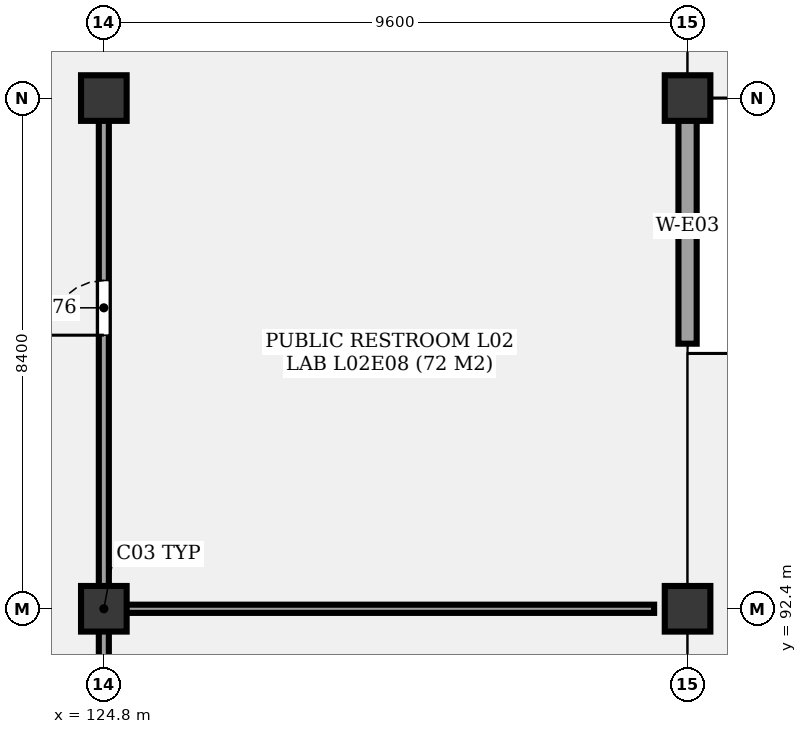
"""IFC4 building model, lengths in metres.
Left out: names, types, materials, properties, quantities, classifications, styles, units other than length and angle.
Written with IfcOpenShell. Run it as: python <this file> out.ifc"""

import sys

from ifc_helpers import new_model, si_unit, direction, frame, frame_2d, origin, origin_2d, place, context, subcontext, project, spatial, rectangle, extrude, element, fill, save


model = new_model("IFC4")
c1 = context("Model", 3, precision=1e-05, world=origin(), true_north=direction((0.0, 1.0)))
c2 = subcontext(c1, "Body", "Model", "MODEL_VIEW")
j1 = project(units=[si_unit("LENGTHUNIT", "METRE"), si_unit("PLANEANGLEUNIT", "RADIAN")], contexts=[c1])
p1 = place(None, origin())
s1 = spatial("IfcSite", under=j1, at=p1, CompositionType="ELEMENT")
p2 = place(p1, origin())
s2 = spatial("IfcBuilding", under=s1, at=p2, CompositionType="ELEMENT")
p3 = place(p2, frame((0.0, 0.0, 9.9)))
s3 = spatial("IfcBuildingStorey", under=s2, at=p3, CompositionType="ELEMENT", Elevation=9.9)
for number, where, z_axis, x_axis in (
    (1, (124.8, 92.4, 0.0), (0.0, 0.0, 1.0), (1.0, 0.0, 0.0)),
    (2, (124.8, 100.8, 0.0), (0.0, 0.0, 1.0), (1.0, 0.0, 0.0)),
    (3, (134.4, 92.4, 0.0), (0.0, 0.0, 1.0), (1.0, 0.0, 0.0)),
    (4, (134.4, 100.8, 0.0), (0.0, 0.0, 1.0), (1.0, 0.0, 0.0)),
):
    element("IfcColumn", number, at=place(p3, frame(where, z_axis=z_axis, x_axis=x_axis)), inside=s3, PredefinedType="COLUMN", context=c2, shape_type="SweptSolid", body=[
        extrude(rectangle(XDim=0.75, YDim=0.75, at=origin_2d()), origin(), (0.0, 0.0, 1.0), 3.6),
    ])
p4 = place(p3, frame((134.4, 100.64, 0.0), z_axis=(0.0, 0.0, 1.0), x_axis=(0.0, -1.0, 0.0)))
e5 = element("IfcWall", 5, at=p4, inside=s3, PredefinedType="SOLIDWALL", context=c2, shape_type="SweptSolid", body=[
    extrude(rectangle(XDim=3.88, YDim=0.3, at=frame_2d((1.94, 0.0))), origin(), (0.0, 0.0, 1.0), 2.57),
])
p5 = place(p3, frame((124.8, 84.25, 0.0), z_axis=(0.0, 0.0, 1.0), x_axis=(0.0, 1.0, 0.0)))
e6 = element("IfcWall", 6, at=p5, inside=s3, PredefinedType="PARTITIONING", context=c2, shape_type="SweptSolid", body=[
    extrude(rectangle(XDim=7.9, YDim=0.165, at=frame_2d((3.95, 0.0))), origin(), (0.0, 0.0, 1.0), 2.48),
])
p6 = place(p5, frame((4.25, 0.0, 0.0)))
e7 = element("IfcOpeningElement", 7, at=p6, cuts=e6, PredefinedType="OPENING", context=c2, shape_type="SweptSolid", body=[
    extrude(rectangle(XDim=1.0, YDim=2.2, at=frame_2d((0.5, 1.1))), frame((0.0, 0.093, 0.0), z_axis=(0.0, -1.0, 0.0), x_axis=(1.0, 0.0, 0.0)), (0.0, 0.0, 1.0), 0.185),
])
p7 = place(p3, frame((124.8, 92.65, 0.0), z_axis=(0.0, 0.0, 1.0), x_axis=(0.0, 1.0, 0.0)))
e8 = element("IfcWall", 8, at=p7, inside=s3, PredefinedType="PARTITIONING", context=c2, shape_type="SweptSolid", body=[
    extrude(rectangle(XDim=7.9, YDim=0.165, at=frame_2d((3.95, 0.0))), origin(), (0.0, 0.0, 1.0), 2.48),
])
p8 = place(p7, frame((4.25, 0.0, 0.0)))
e9 = element("IfcOpeningElement", 9, at=p8, cuts=e8, PredefinedType="OPENING", context=c2, shape_type="SweptSolid", body=[
    extrude(rectangle(XDim=0.9, YDim=2.1, at=frame_2d((0.45, 1.05))), frame((0.0, 0.093, 0.0), z_axis=(0.0, -1.0, 0.0), x_axis=(1.0, 0.0, 0.0)), (0.0, 0.0, 1.0), 0.185),
])
p9 = place(p3, frame((124.95, 92.4, 0.0), z_axis=(0.0, 0.0, 1.0), x_axis=(1.0, 0.0, 0.0)))
e10 = element("IfcWall", 10, at=p9, inside=s3, PredefinedType="PARTITIONING", context=c2, shape_type="SweptSolid", body=[
    extrude(rectangle(XDim=8.9, YDim=0.135, at=frame_2d((4.45, 0.0))), origin(), (0.0, 0.0, 1.0), 2.48),
])
p10 = place(p8, origin())
e11 = element("IfcDoor", 11, at=p10, inside=s3, OperationType="SINGLE_SWING_LEFT", PredefinedType="DOOR", context=c2, shape_type="SweptSolid", body=[
    extrude(rectangle(XDim=0.9, YDim=2.1, at=frame_2d((0.45, 1.05))), frame((0.0, 0.025, 0.0), z_axis=(0.0, -1.0, 0.0), x_axis=(1.0, 0.0, 0.0)), (0.0, 0.0, 1.0), 0.05),
])
fill(e9, e11)
save(model, sys.argv[1])
